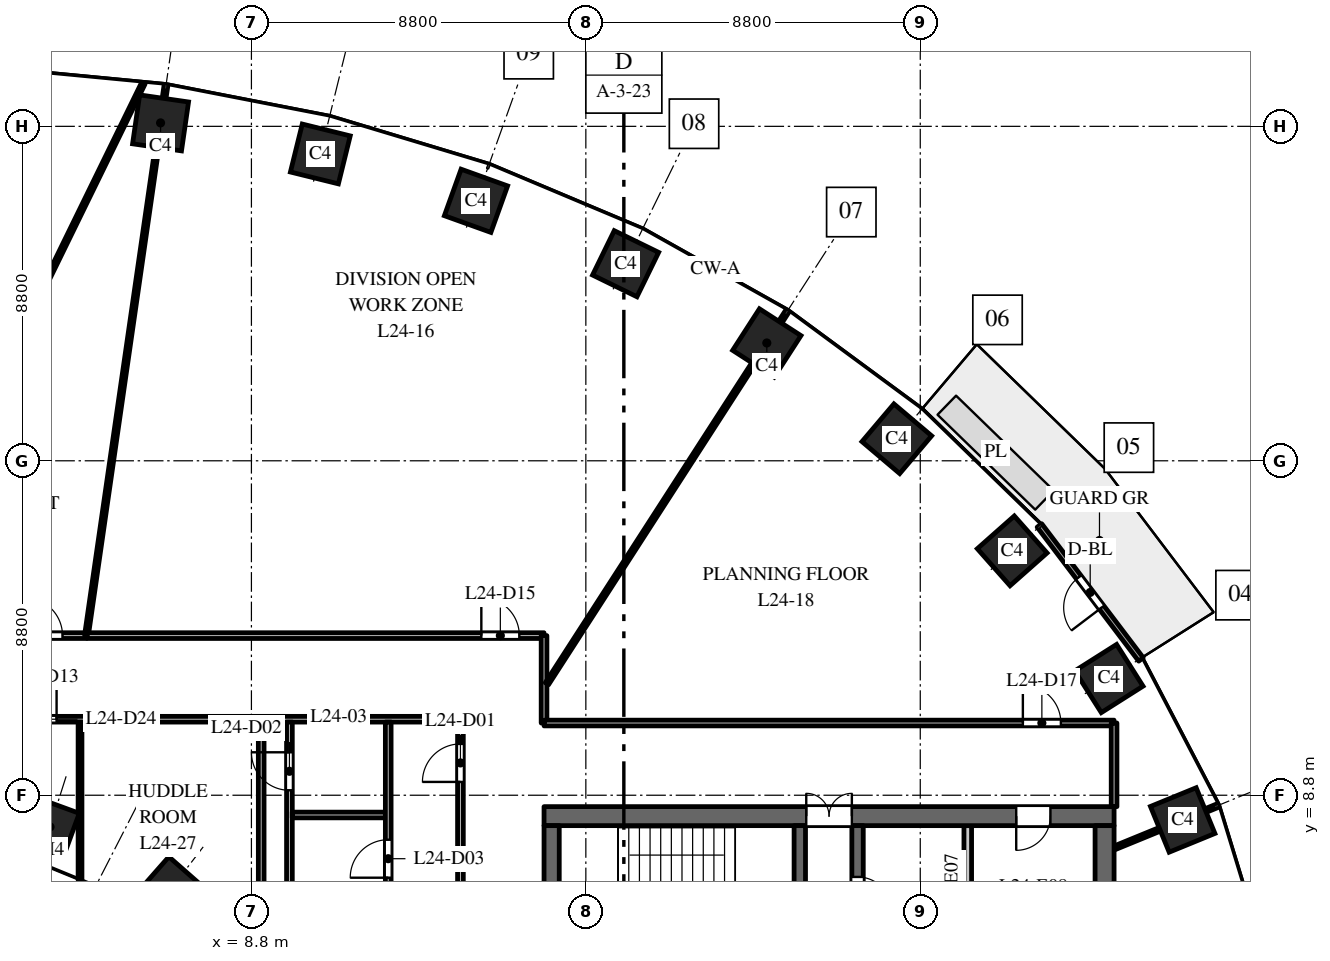
"""IFC4 building model, lengths in metres.
Left out: names, types, materials, properties, quantities, classifications, styles, units other than length and angle.
Written with IfcOpenShell. Run it as: python <this file> out.ifc"""

import sys

from ifc_helpers import new_model, si_unit, direction, frame, frame_2d, origin, origin_2d, place, context, subcontext, project, spatial, rectangle, extrude, element, fill, save


model = new_model("IFC4")
c1 = context("Model", 3, precision=1e-05, world=origin(), true_north=direction((0.0, 1.0)))
c2 = subcontext(c1, "Body", "Model", "MODEL_VIEW")
j1 = project(units=[si_unit("LENGTHUNIT", "METRE"), si_unit("PLANEANGLEUNIT", "RADIAN")], contexts=[c1])
p1 = place(None, origin())
s1 = spatial("IfcSite", under=j1, at=p1, CompositionType="ELEMENT")
p2 = place(p1, origin())
s2 = spatial("IfcBuilding", under=s1, at=p2, CompositionType="ELEMENT")
p3 = place(p2, frame((0.0, 0.0, 108.0)))
s3 = spatial("IfcBuildingStorey", under=s2, at=p3, CompositionType="ELEMENT", Elevation=108.0)
for number, where, z_axis, x_axis in (
    (1, (33.305, 8.149, 0.0), (0.0, 0.0, 1.0), (-0.379, 0.925, 0.0)),
    (2, (31.365, 11.871, 0.0), (0.0, 0.0, 1.0), (-0.535, 0.845, 0.0)),
    (3, (28.819, 15.23, 0.0), (0.0, 0.0, 1.0), (-0.663, 0.749, 0.0)),
    (4, (25.783, 18.18, 0.0), (0.0, 0.0, 1.0), (-0.763, 0.646, 0.0)),
    (5, (22.362, 20.7, 0.0), (0.0, 0.0, 1.0), (-0.84, 0.542, 0.0)),
    (6, (18.646, 22.785, 0.0), (0.0, 0.0, 1.0), (-0.898, 0.439, 0.0)),
    (7, (14.709, 24.441, 0.0), (0.0, 0.0, 1.0), (-0.941, 0.338, 0.0)),
    (8, (10.613, 25.674, 0.0), (0.0, 0.0, 1.0), (-0.971, 0.24, 0.0)),
    (9, (6.409, 26.491, 0.0), (0.0, 0.0, 1.0), (-0.99, 0.143, 0.0)),
):
    element("IfcColumn", number, at=place(p3, frame(where, z_axis=z_axis, x_axis=x_axis)), inside=s3, PredefinedType="COLUMN", context=c2, shape_type="SweptSolid", body=[
        extrude(rectangle(XDim=1.3, YDim=1.3, at=origin_2d()), origin(), (0.0, 0.0, 1.0), 4.0),
    ])
for number, where, z_axis, x_axis in (
    (10, (6.682, 6.334, 0.0), (0.0, 0.0, 1.0), (-0.751, 0.66, 0.0)),
    (11, (3.501, 7.967, 0.0), (0.0, 0.0, 1.0), (-0.939, 0.344, 0.0)),
):
    element("IfcColumn", number, at=place(p3, frame(where, z_axis=z_axis, x_axis=x_axis)), inside=s3, PredefinedType="COLUMN", context=c2, shape_type="SweptSolid", body=[
        extrude(rectangle(XDim=1.2, YDim=1.2, at=origin_2d()), origin(), (0.0, 0.0, 1.0), 4.0),
    ])
p4 = place(p3, frame((16.5, 8.25, 0.0), z_axis=(0.0, 0.0, 1.0), x_axis=(1.0, 0.0, 0.0)))
e12 = element("IfcWall", 12, at=p4, inside=s3, PredefinedType="SHEAR", context=c2, shape_type="SweptSolid", body=[
    extrude(rectangle(XDim=15.0, YDim=0.5, at=frame_2d((7.5, 0.0))), origin(), (0.0, 0.0, 1.0), 3.7),
])
p5 = place(p4, frame((6.9, 0.0, 0.0)))
e13 = element("IfcOpeningElement", 13, at=p5, cuts=e12, PredefinedType="OPENING", context=c2, shape_type="SweptSolid", body=[
    extrude(rectangle(XDim=1.2, YDim=2.1, at=frame_2d((0.6, 1.05))), frame((0.0, 0.26, 0.0), z_axis=(0.0, -1.0, 0.0), x_axis=(1.0, 0.0, 0.0)), (0.0, 0.0, 1.0), 0.52),
])
p6 = place(p4, frame((12.425, 0.0, 0.0)))
e14 = element("IfcOpeningElement", 14, at=p6, cuts=e12, PredefinedType="OPENING", context=c2, shape_type="SweptSolid", body=[
    extrude(rectangle(XDim=0.9, YDim=2.1, at=frame_2d((0.45, 1.05))), frame((0.0, 0.26, 0.0), z_axis=(0.0, -1.0, 0.0), x_axis=(1.0, 0.0, 0.0)), (0.0, 0.0, 1.0), 0.52),
])
p7 = place(p3, frame((24.75, -8.0, 0.0), z_axis=(0.0, 0.0, 1.0), x_axis=(0.0, 1.0, 0.0)))
e15 = element("IfcWall", 15, at=p7, inside=s3, PredefinedType="SHEAR", context=c2, shape_type="SweptSolid", body=[
    extrude(rectangle(XDim=16.0, YDim=0.3, at=frame_2d((8.0, 0.0))), origin(), (0.0, 0.0, 1.0), 3.7),
])
p8 = place(p7, frame((4.425, 0.0, 0.0)))
e16 = element("IfcOpeningElement", 16, at=p8, cuts=e15, PredefinedType="OPENING", context=c2, shape_type="SweptSolid", body=[
    extrude(rectangle(XDim=1.1, YDim=2.1, at=frame_2d((0.55, 1.05))), frame((0.0, 0.16, 0.0), z_axis=(0.0, -1.0, 0.0), x_axis=(1.0, 0.0, 0.0)), (0.0, 0.0, 1.0), 0.32),
])
p9 = place(p7, frame((7.45, 0.0, 0.0)))
e17 = element("IfcOpeningElement", 17, at=p9, cuts=e15, PredefinedType="OPENING", context=c2, shape_type="SweptSolid", body=[
    extrude(rectangle(XDim=1.1, YDim=2.1, at=frame_2d((0.55, 1.05))), frame((0.0, 0.16, 0.0), z_axis=(0.0, -1.0, 0.0), x_axis=(1.0, 0.0, 0.0)), (0.0, 0.0, 1.0), 0.32),
])
p10 = place(p7, frame((10.425, 0.0, 0.0)))
e18 = element("IfcOpeningElement", 18, at=p10, cuts=e15, PredefinedType="OPENING", context=c2, shape_type="SweptSolid", body=[
    extrude(rectangle(XDim=1.2, YDim=2.1, at=frame_2d((0.6, 1.05))), frame((0.0, 0.16, 0.0), z_axis=(0.0, -1.0, 0.0), x_axis=(1.0, 0.0, 0.0)), (0.0, 0.0, 1.0), 0.32),
])
p11 = place(p7, frame((13.75, 0.0, 0.0)))
e19 = element("IfcOpeningElement", 19, at=p11, cuts=e15, PredefinedType="OPENING", context=c2, shape_type="SweptSolid", body=[
    extrude(rectangle(XDim=0.9, YDim=2.1, at=frame_2d((0.45, 1.05))), frame((0.0, 0.16, 0.0), z_axis=(0.0, -1.0, 0.0), x_axis=(1.0, 0.0, 0.0)), (0.0, 0.0, 1.0), 0.32),
])
p12 = place(p7, frame((1.35, 0.0, 0.0)))
e20 = element("IfcOpeningElement", 20, at=p12, cuts=e15, PredefinedType="OPENING", context=c2, shape_type="SweptSolid", body=[
    extrude(rectangle(XDim=0.9, YDim=2.1, at=frame_2d((0.45, 1.05))), frame((0.0, 0.16, 0.0), z_axis=(0.0, -1.0, 0.0), x_axis=(1.0, 0.0, 0.0)), (0.0, 0.0, 1.0), 0.32),
])
p13 = place(p3, frame((16.7, -8.0, 0.0), z_axis=(0.0, 0.0, 1.0), x_axis=(0.0, 1.0, 0.0)))
e21 = element("IfcWall", 21, at=p13, inside=s3, PredefinedType="SHEAR", context=c2, shape_type="SweptSolid", body=[
    extrude(rectangle(XDim=16.0, YDim=0.4, at=frame_2d((8.0, 0.0))), origin(), (0.0, 0.0, 1.0), 3.7),
])
p14 = place(p3, frame((31.25, -8.0, 0.0), z_axis=(0.0, 0.0, 1.0), x_axis=(0.0, 1.0, 0.0)))
e22 = element("IfcWall", 22, at=p14, inside=s3, PredefinedType="SHEAR", context=c2, shape_type="SweptSolid", body=[
    extrude(rectangle(XDim=16.0, YDim=0.5, at=frame_2d((8.0, 0.0))), origin(), (0.0, 0.0, 1.0), 3.7),
])
p15 = place(p3, frame((27.65, 4.75, 0.0), z_axis=(0.0, 0.0, 1.0), x_axis=(0.0, 1.0, 0.0)))
e23 = element("IfcWall", 23, at=p15, inside=s3, PredefinedType="PARTITIONING", context=c2, shape_type="SweptSolid", body=[
    extrude(rectangle(XDim=3.25, YDim=0.2, at=frame_2d((1.625, 0.0))), origin(), (0.0, 0.0, 1.0), 3.7),
])
p16 = place(p3, frame((23.23, 2.25, 0.0), z_axis=(0.0, 0.0, 1.0), x_axis=(0.0, 1.0, 0.0)))
e24 = element("IfcWall", 24, at=p16, inside=s3, PredefinedType="SHEAR", context=c2, shape_type="SweptSolid", body=[
    extrude(rectangle(XDim=5.75, YDim=0.3, at=frame_2d((2.875, 0.0))), origin(), (0.0, 0.0, 1.0), 3.7),
])
p17 = place(p16, frame((0.6, 0.0, 0.0)))
e25 = element("IfcOpeningElement", 25, at=p17, cuts=e24, PredefinedType="OPENING", context=c2, shape_type="SweptSolid", body=[
    extrude(rectangle(XDim=1.0, YDim=2.1, at=frame_2d((0.5, 1.05))), frame((0.0, 0.16, 0.0), z_axis=(0.0, -1.0, 0.0), x_axis=(1.0, 0.0, 0.0)), (0.0, 0.0, 1.0), 0.32),
])
p18 = place(p3, frame((32.208, 12.374, 0.0), z_axis=(0.0, 0.0, 1.0), x_axis=(-0.604045763106, 0.796949632081, 0.0)))
e26 = element("IfcWall", 26, at=p18, inside=s3, PredefinedType="STANDARD", context=c2, shape_type="SweptSolid", body=[
    extrude(rectangle(XDim=4.423, YDim=0.15, at=frame_2d((2.212, 0.0))), origin(), (0.0, 0.0, 1.0), 3.7),
])
p19 = place(p18, frame((1.712, 0.0, 0.0)))
e27 = element("IfcOpeningElement", 27, at=p19, cuts=e26, PredefinedType="OPENING", context=c2, shape_type="SweptSolid", body=[
    extrude(rectangle(XDim=1.0, YDim=2.4, at=frame_2d((0.5, 1.2))), frame((0.0, 0.085, 0.0), z_axis=(0.0, -1.0, 0.0), x_axis=(1.0, 0.0, 0.0)), (0.0, 0.0, 1.0), 0.17),
])
p20 = place(p3, frame((-14.3, 10.8, 0.0), z_axis=(0.0, 0.0, 1.0), x_axis=(1.0, 0.0, 0.0)))
e28 = element("IfcWall", 28, at=p20, inside=s3, PredefinedType="PARTITIONING", context=c2, shape_type="SweptSolid", body=[
    extrude(rectangle(XDim=28.6, YDim=0.15, at=frame_2d((14.3, 0.0))), origin(), (0.0, 0.0, 1.0), 2.85),
])
p21 = place(p20, frame((7.44, 0.0, 0.0)))
e29 = element("IfcOpeningElement", 29, at=p21, cuts=e28, PredefinedType="OPENING", context=c2, shape_type="SweptSolid", body=[
    extrude(rectangle(XDim=1.0, YDim=2.1, at=frame_2d((0.5, 1.05))), frame((0.0, 0.085, 0.0), z_axis=(0.0, -1.0, 0.0), x_axis=(1.0, 0.0, 0.0)), (0.0, 0.0, 1.0), 0.17),
])
p22 = place(p20, frame((12.207, 0.0, 0.0)))
e30 = element("IfcOpeningElement", 30, at=p22, cuts=e28, PredefinedType="OPENING", context=c2, shape_type="SweptSolid", body=[
    extrude(rectangle(XDim=1.0, YDim=2.1, at=frame_2d((0.5, 1.05))), frame((0.0, 0.085, 0.0), z_axis=(0.0, -1.0, 0.0), x_axis=(1.0, 0.0, 0.0)), (0.0, 0.0, 1.0), 0.17),
])
p23 = place(p20, frame((16.973, 0.0, 0.0)))
e31 = element("IfcOpeningElement", 31, at=p23, cuts=e28, PredefinedType="OPENING", context=c2, shape_type="SweptSolid", body=[
    extrude(rectangle(XDim=1.0, YDim=2.1, at=frame_2d((0.5, 1.05))), frame((0.0, 0.085, 0.0), z_axis=(0.0, -1.0, 0.0), x_axis=(1.0, 0.0, 0.0)), (0.0, 0.0, 1.0), 0.17),
])
p24 = place(p3, frame((0.262, 15.887, 0.0), z_axis=(0.0, 0.0, 1.0), x_axis=(0.439206418019, 0.898386176636, 0.0)))
e32 = element("IfcWall", 32, at=p24, inside=s3, PredefinedType="PARTITIONING", context=c2, shape_type="SweptSolid", body=[
    extrude(rectangle(XDim=12.969, YDim=0.1, at=frame_2d((6.484, 0.0))), origin(), (0.0, 0.0, 1.0), 2.9),
])
p25 = place(p3, frame((1.299, 13.0, 0.0), z_axis=(0.0, 0.0, 1.0), x_axis=(1.0, 0.0, 0.0)))
e33 = element("IfcWall", 33, at=p25, inside=s3, PredefinedType="PARTITIONING", context=c2, shape_type="SweptSolid", body=[
    extrude(rectangle(XDim=3.16, YDim=0.15, at=frame_2d((1.58, 0.0))), origin(), (0.0, 0.0, 1.0), 2.85),
])
p26 = place(p25, frame((1.53, 0.0, 0.0)))
e34 = element("IfcOpeningElement", 34, at=p26, cuts=e33, PredefinedType="OPENING", context=c2, shape_type="SweptSolid", body=[
    extrude(rectangle(XDim=1.0, YDim=2.1, at=frame_2d((0.5, 1.05))), frame((0.0, 0.085, 0.0), z_axis=(0.0, -1.0, 0.0), x_axis=(1.0, 0.0, 0.0)), (0.0, 0.0, 1.0), 0.17),
])
p27 = place(p3, frame((4.29, 6.568, 0.0), z_axis=(0.0, 0.0, 1.0), x_axis=(0.0, 1.0, 0.0)))
e35 = element("IfcWall", 35, at=p27, inside=s3, PredefinedType="PARTITIONING", context=c2, shape_type="SweptSolid", body=[
    extrude(rectangle(XDim=4.157, YDim=0.1, at=frame_2d((2.079, 0.0))), origin(), (0.0, 0.0, 1.0), 2.9),
])
p28 = place(p3, frame((4.459, 13.004, 0.0), z_axis=(0.0, 0.0, 1.0), x_axis=(0.143087196312, 0.98971008596, 0.0)))
e36 = element("IfcWall", 36, at=p28, inside=s3, PredefinedType="PARTITIONING", context=c2, shape_type="SweptSolid", body=[
    extrude(rectangle(XDim=14.628, YDim=0.1, at=frame_2d((7.314, 0.0))), origin(), (0.0, 0.0, 1.0), 2.85),
])
p29 = place(p3, frame((4.479, 13.0, 0.0), z_axis=(0.0, 0.0, 1.0), x_axis=(1.0, 0.0, 0.0)))
e37 = element("IfcWall", 37, at=p29, inside=s3, PredefinedType="PARTITIONING", context=c2, shape_type="SweptSolid", body=[
    extrude(rectangle(XDim=12.021, YDim=0.15, at=frame_2d((6.01, 0.0))), origin(), (0.0, 0.0, 1.0), 2.85),
])
p30 = place(p29, frame((10.371, 0.0, 0.0)))
e38 = element("IfcOpeningElement", 38, at=p30, cuts=e37, PredefinedType="OPENING", context=c2, shape_type="SweptSolid", body=[
    extrude(rectangle(XDim=1.0, YDim=2.1, at=frame_2d((0.5, 1.05))), frame((0.0, 0.085, 0.0), z_axis=(0.0, -1.0, 0.0), x_axis=(1.0, 0.0, 0.0)), (0.0, 0.0, 1.0), 0.17),
])
p31 = place(p3, frame((9.057, 0.045, 0.0), z_axis=(0.0, 0.0, 1.0), x_axis=(0.0, 1.0, 0.0)))
e39 = element("IfcWall", 39, at=p31, inside=s3, PredefinedType="PARTITIONING", context=c2, shape_type="SweptSolid", body=[
    extrude(rectangle(XDim=10.68, YDim=0.15, at=frame_2d((5.34, 0.0))), origin(), (0.0, 0.0, 1.0), 2.75),
])
p32 = place(p31, frame((4.605, 0.0, 0.0)))
e40 = element("IfcOpeningElement", 40, at=p32, cuts=e39, PredefinedType="OPENING", context=c2, shape_type="SweptSolid", body=[
    extrude(rectangle(XDim=1.0, YDim=2.1, at=frame_2d((0.5, 1.05))), frame((0.0, 0.085, 0.0), z_axis=(0.0, -1.0, 0.0), x_axis=(1.0, 0.0, 0.0)), (0.0, 0.0, 1.0), 0.17),
])
p33 = place(p3, frame((9.8, 3.66, 0.0), z_axis=(0.0, 0.0, 1.0), x_axis=(0.0, 1.0, 0.0)))
e41 = element("IfcWall", 41, at=p33, inside=s3, PredefinedType="PARTITIONING", context=c2, shape_type="SweptSolid", body=[
    extrude(rectangle(XDim=7.065, YDim=0.15, at=frame_2d((3.533, 0.0))), origin(), (0.0, 0.0, 1.0), 2.75),
])
p34 = place(p33, frame((5.27, 0.0, 0.0)))
e42 = element("IfcOpeningElement", 42, at=p34, cuts=e41, PredefinedType="OPENING", context=c2, shape_type="SweptSolid", body=[
    extrude(rectangle(XDim=1.0, YDim=2.1, at=frame_2d((0.5, 1.05))), frame((0.0, 0.085, 0.0), z_axis=(0.0, -1.0, 0.0), x_axis=(1.0, 0.0, 0.0)), (0.0, 0.0, 1.0), 0.17),
])
p35 = place(p3, frame((9.875, 8.28, 0.0), z_axis=(0.0, 0.0, 1.0), x_axis=(1.0, 0.0, 0.0)))
e43 = element("IfcWall", 43, at=p35, inside=s3, PredefinedType="PARTITIONING", context=c2, shape_type="SweptSolid", body=[
    extrude(rectangle(XDim=2.45, YDim=0.15, at=frame_2d((1.225, 0.0))), origin(), (0.0, 0.0, 1.0), 3.7),
])
p36 = place(p3, frame((12.4, 3.66, 0.0), z_axis=(0.0, 0.0, 1.0), x_axis=(0.0, 1.0, 0.0)))
e44 = element("IfcWall", 44, at=p36, inside=s3, PredefinedType="PARTITIONING", context=c2, shape_type="SweptSolid", body=[
    extrude(rectangle(XDim=7.065, YDim=0.15, at=frame_2d((3.533, 0.0))), origin(), (0.0, 0.0, 1.0), 2.75),
])
p37 = place(p36, frame((2.97, 0.0, 0.0)))
e45 = element("IfcOpeningElement", 45, at=p37, cuts=e44, PredefinedType="OPENING", context=c2, shape_type="SweptSolid", body=[
    extrude(rectangle(XDim=1.0, YDim=2.1, at=frame_2d((0.5, 1.05))), frame((0.0, 0.085, 0.0), z_axis=(0.0, -1.0, 0.0), x_axis=(1.0, 0.0, 0.0)), (0.0, 0.0, 1.0), 0.17),
])
p38 = place(p36, frame((0.618, 0.0, 0.0)))
e46 = element("IfcOpeningElement", 46, at=p38, cuts=e44, PredefinedType="OPENING", context=c2, shape_type="SweptSolid", body=[
    extrude(rectangle(XDim=1.0, YDim=2.1, at=frame_2d((0.5, 1.05))), frame((0.0, 0.085, 0.0), z_axis=(0.0, -1.0, 0.0), x_axis=(1.0, 0.0, 0.0)), (0.0, 0.0, 1.0), 0.17),
])
p39 = place(p3, frame((14.3, -10.8, 0.0), z_axis=(0.0, 0.0, 1.0), x_axis=(0.0, 1.0, 0.0)))
e47 = element("IfcWall", 47, at=p39, inside=s3, PredefinedType="PARTITIONING", context=c2, shape_type="SweptSolid", body=[
    extrude(rectangle(XDim=21.6, YDim=0.15, at=frame_2d((10.8, 0.0))), origin(), (0.0, 0.0, 1.0), 2.75),
])
p40 = place(p39, frame((19.95, 0.0, 0.0)))
e48 = element("IfcOpeningElement", 48, at=p40, cuts=e47, PredefinedType="OPENING", context=c2, shape_type="SweptSolid", body=[
    extrude(rectangle(XDim=1.0, YDim=2.1, at=frame_2d((0.5, 1.05))), frame((0.0, 0.085, 0.0), z_axis=(0.0, -1.0, 0.0), x_axis=(1.0, 0.0, 0.0)), (0.0, 0.0, 1.0), 0.17),
])
p41 = place(p3, frame((16.5, 10.7, 0.0), z_axis=(0.0, 0.0, 1.0), x_axis=(0.0, 1.0, 0.0)))
e49 = element("IfcWall", 49, at=p41, inside=s3, PredefinedType="PARTITIONING", context=c2, shape_type="SweptSolid", body=[
    extrude(rectangle(XDim=2.3, YDim=0.15, at=frame_2d((1.15, 0.0))), origin(), (0.0, 0.0, 1.0), 3.7),
])
p42 = place(p3, frame((16.5, 10.7, 0.0), z_axis=(0.0, 0.0, 1.0), x_axis=(1.0, 0.0, 0.0)))
e50 = element("IfcWall", 50, at=p42, inside=s3, PredefinedType="PARTITIONING", context=c2, shape_type="SweptSolid", body=[
    extrude(rectangle(XDim=15.0, YDim=0.15, at=frame_2d((7.5, 0.0))), origin(), (0.0, 0.0, 1.0), 2.75),
])
p43 = place(p42, frame((12.6, 0.0, 0.0)))
e51 = element("IfcOpeningElement", 51, at=p43, cuts=e50, PredefinedType="OPENING", context=c2, shape_type="SweptSolid", body=[
    extrude(rectangle(XDim=1.0, YDim=2.1, at=frame_2d((0.5, 1.05))), frame((0.0, 0.085, 0.0), z_axis=(0.0, -1.0, 0.0), x_axis=(1.0, 0.0, 0.0)), (0.0, 0.0, 1.0), 0.17),
])
p44 = place(p3, frame((16.575, 11.733, 0.0), z_axis=(0.0, 0.0, 1.0), x_axis=(0.54222594427, 0.840232720953, 0.0)))
e52 = element("IfcWall", 52, at=p44, inside=s3, PredefinedType="PARTITIONING", context=c2, shape_type="SweptSolid", body=[
    extrude(rectangle(XDim=11.674, YDim=0.1, at=frame_2d((5.837, 0.0))), origin(), (0.0, 0.0, 1.0), 3.7),
])
p45 = place(p3, frame((31.5, 7.41, 0.0), z_axis=(0.0, 0.0, 1.0), x_axis=(0.925344112436, 0.379128307542, 0.0)))
e53 = element("IfcWall", 53, at=p45, inside=s3, PredefinedType="PARTITIONING", context=c2, shape_type="SweptSolid", body=[
    extrude(rectangle(XDim=2.954, YDim=0.1, at=frame_2d((1.477, 0.0))), origin(), (0.0, 0.0, 1.0), 3.7),
])
p46 = place(p3, frame((31.5, 8.5, 0.0), z_axis=(0.0, 0.0, 1.0), x_axis=(0.0, 1.0, 0.0)))
e54 = element("IfcWall", 54, at=p46, inside=s3, PredefinedType="PARTITIONING", context=c2, shape_type="SweptSolid", body=[
    extrude(rectangle(XDim=2.2, YDim=0.15, at=frame_2d((1.1, 0.0))), origin(), (0.0, 0.0, 1.0), 2.9),
])
p47 = place(p5, origin())
e55 = element("IfcDoor", 55, at=p47, inside=s3, OperationType="DOUBLE_DOOR_DOUBLE_SWING", PredefinedType="DOOR", context=c2, shape_type="SweptSolid", body=[
    extrude(rectangle(XDim=1.2, YDim=2.1, at=frame_2d((0.6, 1.05))), frame((0.0, 0.025, 0.0), z_axis=(0.0, -1.0, 0.0), x_axis=(1.0, 0.0, 0.0)), (0.0, 0.0, 1.0), 0.05),
])
fill(e13, e55)
p48 = place(p11, origin())
e56 = element("IfcDoor", 56, at=p48, inside=s3, OperationType="SINGLE_SWING_LEFT", PredefinedType="DOOR", context=c2, shape_type="SweptSolid", body=[
    extrude(rectangle(XDim=0.9, YDim=2.1, at=frame_2d((0.45, 1.05))), frame((0.0, 0.025, 0.0), z_axis=(0.0, -1.0, 0.0), x_axis=(1.0, 0.0, 0.0)), (0.0, 0.0, 1.0), 0.05),
])
fill(e19, e56)
p49 = place(p6, origin())
e57 = element("IfcDoor", 57, at=p49, inside=s3, OperationType="SINGLE_SWING_LEFT", PredefinedType="DOOR", context=c2, shape_type="SweptSolid", body=[
    extrude(rectangle(XDim=0.9, YDim=2.1, at=frame_2d((0.45, 1.05))), frame((0.0, 0.025, 0.0), z_axis=(0.0, -1.0, 0.0), x_axis=(1.0, 0.0, 0.0)), (0.0, 0.0, 1.0), 0.05),
])
fill(e14, e57)
p50 = place(p19, origin())
e58 = element("IfcDoor", 58, at=p50, inside=s3, OperationType="SINGLE_SWING_LEFT", PredefinedType="DOOR", context=c2, shape_type="SweptSolid", body=[
    extrude(rectangle(XDim=1.0, YDim=2.4, at=frame_2d((0.5, 1.2))), frame((0.0, 0.025, 0.0), z_axis=(0.0, -1.0, 0.0), x_axis=(1.0, 0.0, 0.0)), (0.0, 0.0, 1.0), 0.05),
])
fill(e27, e58)
p51 = place(p40, origin())
e59 = element("IfcDoor", 59, at=p51, inside=s3, OperationType="SINGLE_SWING_LEFT", PredefinedType="DOOR", context=c2, shape_type="SweptSolid", body=[
    extrude(rectangle(XDim=1.0, YDim=2.1, at=frame_2d((0.5, 1.05))), frame((0.0, 0.025, 0.0), z_axis=(0.0, -1.0, 0.0), x_axis=(1.0, 0.0, 0.0)), (0.0, 0.0, 1.0), 0.05),
])
fill(e48, e59)
p52 = place(p34, origin())
e60 = element("IfcDoor", 60, at=p52, inside=s3, OperationType="SINGLE_SWING_RIGHT", PredefinedType="DOOR", context=c2, shape_type="SweptSolid", body=[
    extrude(rectangle(XDim=1.0, YDim=2.1, at=frame_2d((0.5, 1.05))), frame((0.0, 0.025, 0.0), z_axis=(0.0, -1.0, 0.0), x_axis=(1.0, 0.0, 0.0)), (0.0, 0.0, 1.0), 0.05),
])
fill(e42, e60)
p53 = place(p37, origin())
e61 = element("IfcDoor", 61, at=p53, inside=s3, OperationType="SINGLE_SWING_LEFT", PredefinedType="DOOR", context=c2, shape_type="SweptSolid", body=[
    extrude(rectangle(XDim=1.0, YDim=2.1, at=frame_2d((0.5, 1.05))), frame((0.0, 0.025, 0.0), z_axis=(0.0, -1.0, 0.0), x_axis=(1.0, 0.0, 0.0)), (0.0, 0.0, 1.0), 0.05),
])
fill(e45, e61)
p54 = place(p26, origin())
e62 = element("IfcDoor", 62, at=p54, inside=s3, OperationType="SINGLE_SWING_LEFT", PredefinedType="DOOR", context=c2, shape_type="SweptSolid", body=[
    extrude(rectangle(XDim=1.0, YDim=2.1, at=frame_2d((0.5, 1.05))), frame((0.0, 0.025, 0.0), z_axis=(0.0, -1.0, 0.0), x_axis=(1.0, 0.0, 0.0)), (0.0, 0.0, 1.0), 0.05),
])
fill(e34, e62)
p55 = place(p30, origin())
e63 = element("IfcDoor", 63, at=p55, inside=s3, OperationType="SINGLE_SWING_LEFT", PredefinedType="DOOR", context=c2, shape_type="SweptSolid", body=[
    extrude(rectangle(XDim=1.0, YDim=2.1, at=frame_2d((0.5, 1.05))), frame((0.0, 0.025, 0.0), z_axis=(0.0, -1.0, 0.0), x_axis=(1.0, 0.0, 0.0)), (0.0, 0.0, 1.0), 0.05),
])
fill(e38, e63)
p56 = place(p43, origin())
e64 = element("IfcDoor", 64, at=p56, inside=s3, OperationType="SINGLE_SWING_LEFT", PredefinedType="DOOR", context=c2, shape_type="SweptSolid", body=[
    extrude(rectangle(XDim=1.0, YDim=2.1, at=frame_2d((0.5, 1.05))), frame((0.0, 0.025, 0.0), z_axis=(0.0, -1.0, 0.0), x_axis=(1.0, 0.0, 0.0)), (0.0, 0.0, 1.0), 0.05),
])
fill(e51, e64)
p57 = place(p23, origin())
e65 = element("IfcDoor", 65, at=p57, inside=s3, OperationType="SINGLE_SWING_RIGHT", PredefinedType="DOOR", context=c2, shape_type="SweptSolid", body=[
    extrude(rectangle(XDim=1.0, YDim=2.1, at=frame_2d((0.5, 1.05))), frame((0.0, 0.025, 0.0), z_axis=(0.0, -1.0, 0.0), x_axis=(1.0, 0.0, 0.0)), (0.0, 0.0, 1.0), 0.05),
])
fill(e31, e65)
save(model, sys.argv[1])
